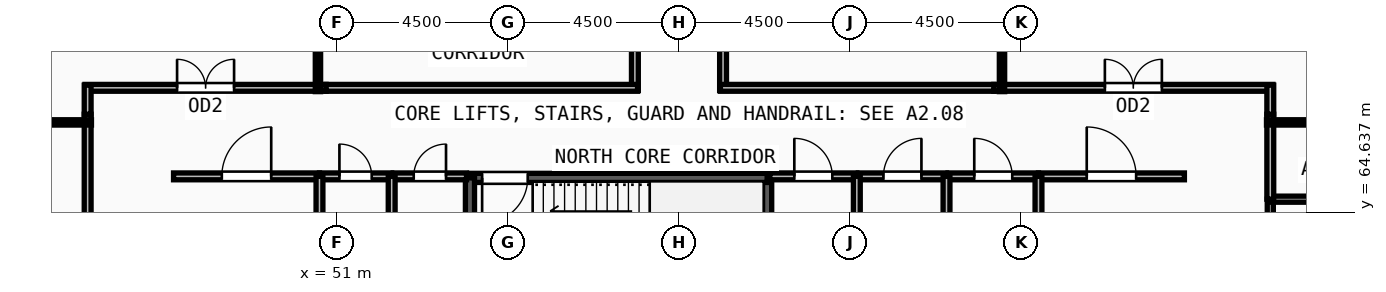
"""IFC4 building model, lengths in metres.
Left out: names, types, materials, properties, quantities, classifications, styles, units other than length and angle.
Written with IfcOpenShell. Run it as: python <this file> out.ifc"""

import sys

from ifc_helpers import new_model, si_unit, direction, frame, frame_2d, origin, place, context, subcontext, project, spatial, rectangle, extrude, source, transform, mapped, element, fill, save


model = new_model("IFC4")
c1 = context("Model", 3, precision=1e-05, world=origin(), true_north=direction((0.0, 1.0)))
c2 = subcontext(c1, "Body", "Model", "MODEL_VIEW")
j1 = project(units=[si_unit("LENGTHUNIT", "METRE"), si_unit("PLANEANGLEUNIT", "RADIAN")], contexts=[c1])
p1 = place(None, origin())
s1 = spatial("IfcSite", under=j1, at=p1, CompositionType="ELEMENT")
p2 = place(p1, origin())
s2 = spatial("IfcBuilding", under=s1, at=p2, CompositionType="ELEMENT")
p3 = place(p2, frame((0.0, 0.0, 85.5)))
s3 = spatial("IfcBuildingStorey", under=s2, at=p3, CompositionType="ELEMENT", Elevation=85.5)
p4 = place(p3, frame((62.32, 62.1, 0.0), z_axis=(0.0, 0.0, 1.0), x_axis=(0.0, 1.0, 0.0)))
e1 = element("IfcWall", 1, at=p4, inside=s3, PredefinedType="SOLIDWALL", context=c2, shape_type="SweptSolid", body=[
    extrude(rectangle(XDim=3.44, YDim=0.24, at=frame_2d((1.72, 0.0))), origin(), (0.0, 0.0, 1.0), 3.57),
])
p5 = place(p3, frame((62.32, 65.54, 0.0), z_axis=(0.0, 0.0, 1.0), x_axis=(-1.0, 0.0, 0.0)))
e2 = element("IfcWall", 2, at=p5, inside=s3, PredefinedType="SOLIDWALL", context=c2, shape_type="SweptSolid", body=[
    extrude(rectangle(XDim=7.82, YDim=0.24, at=frame_2d((3.91, 0.0))), origin(), (0.0, 0.0, 1.0), 3.57),
])
m1 = source(origin(), c2, "Body", "SweptSolid", [
    extrude(rectangle(XDim=1.2, YDim=2.2, at=frame_2d((0.6, 1.1))), frame((0.0, 0.13, 0.0), z_axis=(0.0, -1.0, 0.0), x_axis=(1.0, 0.0, 0.0)), (0.0, 0.0, 1.0), 0.26),
])
p6 = place(p5, frame((6.3, 0.0, 0.0)))
e3 = element("IfcOpeningElement", 3, at=p6, cuts=e2, PredefinedType="OPENING", context=c2, shape_type="MappedRepresentation", body=[
    mapped(m1, transform((0.0, 0.0, 0.0), x_axis=(1.0, 0.0, 0.0), y_axis=(0.0, 1.0, 0.0), z_axis=(0.0, 0.0, 1.0), scale=1.0)),
])
p7 = place(p3, frame((54.5, 65.54, 0.0), z_axis=(0.0, 0.0, 1.0), x_axis=(0.0, -1.0, 0.0)))
e4 = element("IfcWall", 4, at=p7, inside=s3, PredefinedType="SOLIDWALL", context=c2, shape_type="SweptSolid", body=[
    extrude(rectangle(XDim=3.44, YDim=0.24, at=frame_2d((1.72, 0.0))), origin(), (0.0, 0.0, 1.0), 3.57),
])
p8 = place(p3, frame((75.56, 62.24, 0.0), z_axis=(0.0, 0.0, 1.0), x_axis=(0.0, 1.0, 0.0)))
e5 = element("IfcWall", 5, at=p8, inside=s3, PredefinedType="PARTITIONING", context=c2, shape_type="SweptSolid", body=[
    extrude(rectangle(XDim=2.74, YDim=0.16, at=frame_2d((1.37, 0.0))), origin(), (0.0, 0.0, 1.0), 3.57),
])
m2 = source(origin(), c2, "Body", "SweptSolid", [
    extrude(rectangle(XDim=1.05, YDim=2.15, at=frame_2d((0.525, 1.075))), frame((0.0, 0.09, 0.0), z_axis=(0.0, -1.0, 0.0), x_axis=(1.0, 0.0, 0.0)), (0.0, 0.0, 1.0), 0.18),
])
p9 = place(p8, frame((0.845, 0.0, 0.0)))
e6 = element("IfcOpeningElement", 6, at=p9, cuts=e5, PredefinedType="OPENING", context=c2, shape_type="MappedRepresentation", body=[
    mapped(m2, transform((0.0, 0.0, 0.0), x_axis=(1.0, 0.0, 0.0), y_axis=(0.0, 1.0, 0.0), z_axis=(0.0, 0.0, 1.0), scale=1.0)),
])
p10 = place(p3, frame((50.54, 65.58, 0.0), z_axis=(0.0, 0.0, 1.0), x_axis=(1.0, 0.0, 0.0)))
e7 = element("IfcWall", 7, at=p10, inside=s3, PredefinedType="PARTITIONING", context=c2, shape_type="SweptSolid", body=[
    extrude(rectangle(XDim=1.9, YDim=0.18, at=frame_2d((0.95, 0.0))), origin(), (0.0, 0.0, 1.0), 3.57),
])
m3 = source(origin(), c2, "Body", "SweptSolid", [
    extrude(rectangle(XDim=0.85, YDim=2.1, at=frame_2d((0.425, 1.05))), frame((0.0, 0.1, 0.0), z_axis=(0.0, -1.0, 0.0), x_axis=(1.0, 0.0, 0.0)), (0.0, 0.0, 1.0), 0.2),
])
p11 = place(p10, frame((0.525, 0.0, 0.0)))
e8 = element("IfcOpeningElement", 8, at=p11, cuts=e7, PredefinedType="OPENING", context=c2, shape_type="MappedRepresentation", body=[
    mapped(m3, transform((0.0, 0.0, 0.0), x_axis=(1.0, 0.0, 0.0), y_axis=(0.0, 1.0, 0.0), z_axis=(0.0, 0.0, 1.0), scale=1.0)),
])
p12 = place(p3, frame((52.48, 65.58, 0.0), z_axis=(0.0, 0.0, 1.0), x_axis=(1.0, 0.0, 0.0)))
e9 = element("IfcWall", 9, at=p12, inside=s3, PredefinedType="PARTITIONING", context=c2, shape_type="SweptSolid", body=[
    extrude(rectangle(XDim=1.93, YDim=0.18, at=frame_2d((0.965, 0.0))), origin(), (0.0, 0.0, 1.0), 3.57),
])
p13 = place(p12, frame((0.54, 0.0, 0.0)))
e10 = element("IfcOpeningElement", 10, at=p13, cuts=e9, PredefinedType="OPENING", context=c2, shape_type="MappedRepresentation", body=[
    mapped(m3, transform((0.0, 0.0, 0.0), x_axis=(1.0, 0.0, 0.0), y_axis=(0.0, 1.0, 0.0), z_axis=(0.0, 0.0, 1.0), scale=1.0)),
])
p14 = place(p3, frame((62.39, 65.58, 0.0), z_axis=(0.0, 0.0, 1.0), x_axis=(1.0, 0.0, 0.0)))
e11 = element("IfcWall", 11, at=p14, inside=s3, PredefinedType="PARTITIONING", context=c2, shape_type="SweptSolid", body=[
    extrude(rectangle(XDim=2.29, YDim=0.18, at=frame_2d((1.145, 0.0))), origin(), (0.0, 0.0, 1.0), 3.57),
])
m4 = source(origin(), c2, "Body", "SweptSolid", [
    extrude(rectangle(XDim=1.0, YDim=2.2, at=frame_2d((0.5, 1.1))), frame((0.0, 0.1, 0.0), z_axis=(0.0, -1.0, 0.0), x_axis=(1.0, 0.0, 0.0)), (0.0, 0.0, 1.0), 0.2),
])
p15 = place(p14, frame((0.645, 0.0, 0.0)))
e12 = element("IfcOpeningElement", 12, at=p15, cuts=e11, PredefinedType="OPENING", context=c2, shape_type="MappedRepresentation", body=[
    mapped(m4, transform((0.0, 0.0, 0.0), x_axis=(1.0, 0.0, 0.0), y_axis=(0.0, 1.0, 0.0), z_axis=(0.0, 0.0, 1.0), scale=1.0)),
])
p16 = place(p3, frame((64.72, 65.58, 0.0), z_axis=(0.0, 0.0, 1.0), x_axis=(1.0, 0.0, 0.0)))
e13 = element("IfcWall", 13, at=p16, inside=s3, PredefinedType="PARTITIONING", context=c2, shape_type="SweptSolid", body=[
    extrude(rectangle(XDim=2.32, YDim=0.18, at=frame_2d((1.16, 0.0))), origin(), (0.0, 0.0, 1.0), 3.57),
])
p17 = place(p16, frame((0.66, 0.0, 0.0)))
e14 = element("IfcOpeningElement", 14, at=p17, cuts=e13, PredefinedType="OPENING", context=c2, shape_type="MappedRepresentation", body=[
    mapped(m4, transform((0.0, 0.0, 0.0), x_axis=(1.0, 0.0, 0.0), y_axis=(0.0, 1.0, 0.0), z_axis=(0.0, 0.0, 1.0), scale=1.0)),
])
p18 = place(p3, frame((67.08, 65.58, 0.0), z_axis=(0.0, 0.0, 1.0), x_axis=(1.0, 0.0, 0.0)))
e15 = element("IfcWall", 15, at=p18, inside=s3, PredefinedType="PARTITIONING", context=c2, shape_type="SweptSolid", body=[
    extrude(rectangle(XDim=2.38, YDim=0.18, at=frame_2d((1.19, 0.0))), origin(), (0.0, 0.0, 1.0), 3.57),
])
p19 = place(p18, frame((0.69, 0.0, 0.0)))
e16 = element("IfcOpeningElement", 16, at=p19, cuts=e15, PredefinedType="OPENING", context=c2, shape_type="MappedRepresentation", body=[
    mapped(m4, transform((0.0, 0.0, 0.0), x_axis=(1.0, 0.0, 0.0), y_axis=(0.0, 1.0, 0.0), z_axis=(0.0, 0.0, 1.0), scale=1.0)),
])
p20 = place(p3, frame((46.7, 65.58, 0.0), z_axis=(0.0, 0.0, 1.0), x_axis=(1.0, 0.0, 0.0)))
e17 = element("IfcWall", 17, at=p20, inside=s3, PredefinedType="PARTITIONING", context=c2, shape_type="SweptSolid", body=[
    extrude(rectangle(XDim=3.84, YDim=0.18, at=frame_2d((1.92, 0.0))), origin(), (0.0, 0.0, 1.0), 3.57),
])
m5 = source(origin(), c2, "Body", "SweptSolid", [
    extrude(rectangle(XDim=1.3, YDim=2.2, at=frame_2d((0.65, 1.1))), frame((0.0, 0.1, 0.0), z_axis=(0.0, -1.0, 0.0), x_axis=(1.0, 0.0, 0.0)), (0.0, 0.0, 1.0), 0.2),
])
p21 = place(p20, frame((1.27, 0.0, 0.0)))
e18 = element("IfcOpeningElement", 18, at=p21, cuts=e17, PredefinedType="OPENING", context=c2, shape_type="MappedRepresentation", body=[
    mapped(m5, transform((0.0, 0.0, 0.0), x_axis=(1.0, 0.0, 0.0), y_axis=(0.0, 1.0, 0.0), z_axis=(0.0, 0.0, 1.0), scale=1.0)),
])
p22 = place(p3, frame((69.46, 65.58, 0.0), z_axis=(0.0, 0.0, 1.0), x_axis=(1.0, 0.0, 0.0)))
e19 = element("IfcWall", 19, at=p22, inside=s3, PredefinedType="PARTITIONING", context=c2, shape_type="SweptSolid", body=[
    extrude(rectangle(XDim=3.84, YDim=0.18, at=frame_2d((1.92, 0.0))), origin(), (0.0, 0.0, 1.0), 3.57),
])
p23 = place(p22, frame((1.27, 0.0, 0.0)))
e20 = element("IfcOpeningElement", 20, at=p23, cuts=e19, PredefinedType="OPENING", context=c2, shape_type="MappedRepresentation", body=[
    mapped(m5, transform((0.0, 0.0, 0.0), x_axis=(1.0, 0.0, 0.0), y_axis=(0.0, 1.0, 0.0), z_axis=(0.0, 0.0, 1.0), scale=1.0)),
])
p24 = place(p3, frame((68.285, 67.91, 0.0), z_axis=(0.0, 0.0, 1.0), x_axis=(1.0, 0.0, 0.0)))
e21 = element("IfcWall", 21, at=p24, inside=s3, PredefinedType="PARTITIONING", context=c2, shape_type="SweptSolid", body=[
    extrude(rectangle(XDim=7.345, YDim=0.18, at=frame_2d((3.672, 0.0))), origin(), (0.0, 0.0, 1.0), 3.57),
])
m6 = source(origin(), c2, "Body", "SweptSolid", [
    extrude(rectangle(XDim=1.5, YDim=2.2, at=frame_2d((0.75, 1.1))), frame((0.0, 0.1, 0.0), z_axis=(0.0, -1.0, 0.0), x_axis=(1.0, 0.0, 0.0)), (0.0, 0.0, 1.0), 0.2),
])
p25 = place(p24, frame((2.922, 0.0, 0.0)))
e22 = element("IfcOpeningElement", 22, at=p25, cuts=e21, PredefinedType="OPENING", context=c2, shape_type="MappedRepresentation", body=[
    mapped(m6, transform((0.0, 0.0, 0.0), x_axis=(1.0, 0.0, 0.0), y_axis=(0.0, 1.0, 0.0), z_axis=(0.0, 0.0, 1.0), scale=1.0)),
])
p26 = place(p3, frame((61.16, 81.479, 0.0), z_axis=(0.0, 0.0, 1.0), x_axis=(0.0, -1.0, 0.0)))
e23 = element("IfcWall", 23, at=p26, inside=s3, PredefinedType="PARTITIONING", context=c2, shape_type="SweptSolid", body=[
    extrude(rectangle(XDim=13.639, YDim=0.18, at=frame_2d((6.819, 0.0))), origin(), (0.0, 0.0, 1.0), 3.57),
])
p27 = place(p26, frame((6.319, 0.0, 0.0)))
e24 = element("IfcOpeningElement", 24, at=p27, cuts=e23, PredefinedType="OPENING", context=c2, shape_type="MappedRepresentation", body=[
    mapped(m4, transform((0.0, 0.0, 0.0), x_axis=(1.0, 0.0, 0.0), y_axis=(0.0, 1.0, 0.0), z_axis=(0.0, 0.0, 1.0), scale=1.0)),
])
p28 = place(p3, frame((58.84, 67.84, 0.0), z_axis=(0.0, 0.0, 1.0), x_axis=(0.0, 1.0, 0.0)))
e25 = element("IfcWall", 25, at=p28, inside=s3, PredefinedType="PARTITIONING", context=c2, shape_type="SweptSolid", body=[
    extrude(rectangle(XDim=13.771, YDim=0.18, at=frame_2d((6.885, 0.0))), origin(), (0.0, 0.0, 1.0), 3.57),
])
p29 = place(p28, frame((6.386, 0.0, 0.0)))
e26 = element("IfcOpeningElement", 26, at=p29, cuts=e25, PredefinedType="OPENING", context=c2, shape_type="MappedRepresentation", body=[
    mapped(m4, transform((0.0, 0.0, 0.0), x_axis=(1.0, 0.0, 0.0), y_axis=(0.0, 1.0, 0.0), z_axis=(0.0, 0.0, 1.0), scale=1.0)),
])
p30 = place(p3, frame((44.37, 67.91, 0.0), z_axis=(0.0, 0.0, 1.0), x_axis=(1.0, 0.0, 0.0)))
e27 = element("IfcWall", 27, at=p30, inside=s3, PredefinedType="PARTITIONING", context=c2, shape_type="SweptSolid", body=[
    extrude(rectangle(XDim=6.345, YDim=0.18, at=frame_2d((3.172, 0.0))), origin(), (0.0, 0.0, 1.0), 3.57),
])
p31 = place(p30, frame((2.423, 0.0, 0.0)))
e28 = element("IfcOpeningElement", 28, at=p31, cuts=e27, PredefinedType="OPENING", context=c2, shape_type="MappedRepresentation", body=[
    mapped(m6, transform((0.0, 0.0, 0.0), x_axis=(1.0, 0.0, 0.0), y_axis=(0.0, 1.0, 0.0), z_axis=(0.0, 0.0, 1.0), scale=1.0)),
])
p32 = place(p3, frame((44.44, 60.285, 0.0), z_axis=(0.0, 0.0, 1.0), x_axis=(0.0, 1.0, 0.0)))
e29 = element("IfcWall", 29, at=p32, inside=s3, PredefinedType="PARTITIONING", context=c2, shape_type="SweptSolid", body=[
    extrude(rectangle(XDim=6.93, YDim=0.18, at=frame_2d((3.465, 0.0))), origin(), (0.0, 0.0, 1.0), 3.57),
])
p33 = place(p32, frame((2.715, 0.0, 0.0)))
e30 = element("IfcOpeningElement", 30, at=p33, cuts=e29, PredefinedType="OPENING", context=c2, shape_type="MappedRepresentation", body=[
    mapped(m6, transform((0.0, 0.0, 0.0), x_axis=(1.0, 0.0, 0.0), y_axis=(0.0, 1.0, 0.0), z_axis=(0.0, 0.0, 1.0), scale=1.0)),
])
p34 = place(p3, frame((75.56, 64.98, 0.0), z_axis=(0.0, 0.0, 1.0), x_axis=(1.0, 0.0, 0.0)))
e31 = element("IfcWall", 31, at=p34, inside=s3, PredefinedType="PARTITIONING", context=c2, shape_type="SweptSolid", body=[
    extrude(rectangle(XDim=4.46, YDim=0.16, at=frame_2d((2.23, 0.0))), origin(), (0.0, 0.0, 1.0), 3.57),
])
for number, where, z_axis, x_axis in (
    (32, (50.54, 61.95, 0.0), (0.0, 0.0, 1.0), (0.0, 1.0, 0.0)),
    (33, (52.44, 61.95, 0.0), (0.0, 0.0, 1.0), (0.0, 1.0, 0.0)),
    (34, (64.68, 61.95, 0.0), (0.0, 0.0, 1.0), (0.0, 1.0, 0.0)),
    (35, (67.04, 61.95, 0.0), (0.0, 0.0, 1.0), (0.0, 1.0, 0.0)),
    (36, (69.46, 61.95, 0.0), (0.0, 0.0, 1.0), (0.0, 1.0, 0.0)),
):
    element("IfcWall", number, at=place(p3, frame(where, z_axis=z_axis, x_axis=x_axis)), inside=s3, PredefinedType="PARTITIONING", context=c2, shape_type="SweptSolid", body=[
        extrude(rectangle(XDim=3.63, YDim=0.18, at=frame_2d((1.815, 0.0))), origin(), (0.0, 0.0, 1.0), 3.57),
    ])
p35 = place(p3, frame((75.56, 67.215, 0.0), z_axis=(0.0, 0.0, 1.0), x_axis=(0.0, -1.0, 0.0)))
e37 = element("IfcWall", 37, at=p35, inside=s3, PredefinedType="PARTITIONING", context=c2, shape_type="SweptSolid", body=[
    extrude(rectangle(XDim=2.235, YDim=0.18, at=frame_2d((1.118, 0.0))), origin(), (0.0, 0.0, 1.0), 3.57),
])
p36 = place(p3, frame((75.56, 67.98, 0.0), z_axis=(0.0, 0.0, 1.0), x_axis=(0.0, -1.0, 0.0)))
e38 = element("IfcWall", 38, at=p36, inside=s3, PredefinedType="PARTITIONING", context=c2, shape_type="SweptSolid", body=[
    extrude(rectangle(XDim=0.765, YDim=0.18, at=frame_2d((0.382, 0.0))), origin(), (0.0, 0.0, 1.0), 3.57),
])
p37 = place(p3, frame((61.09, 67.91, 0.0), z_axis=(0.0, 0.0, 1.0), x_axis=(1.0, 0.0, 0.0)))
e39 = element("IfcWall", 39, at=p37, inside=s3, PredefinedType="PARTITIONING", context=c2, shape_type="SweptSolid", body=[
    extrude(rectangle(XDim=7.195, YDim=0.18, at=frame_2d((3.597, 0.0))), origin(), (0.0, 0.0, 1.0), 3.57),
])
p38 = place(p3, frame((50.715, 67.91, 0.0), z_axis=(0.0, 0.0, 1.0), x_axis=(1.0, 0.0, 0.0)))
e40 = element("IfcWall", 40, at=p38, inside=s3, PredefinedType="PARTITIONING", context=c2, shape_type="SweptSolid", body=[
    extrude(rectangle(XDim=8.195, YDim=0.18, at=frame_2d((4.097, 0.0))), origin(), (0.0, 0.0, 1.0), 3.57),
])
p39 = place(p3, frame((44.44, 67.215, 0.0), z_axis=(0.0, 0.0, 1.0), x_axis=(0.0, 1.0, 0.0)))
e41 = element("IfcWall", 41, at=p39, inside=s3, PredefinedType="PARTITIONING", context=c2, shape_type="SweptSolid", body=[
    extrude(rectangle(XDim=0.765, YDim=0.18, at=frame_2d((0.382, 0.0))), origin(), (0.0, 0.0, 1.0), 3.57),
])
p40 = place(p3, frame((44.54, 67.0, 0.0), z_axis=(0.0, 0.0, 1.0), x_axis=(-1.0, 0.0, 0.0)))
e42 = element("IfcWall", 42, at=p40, inside=s3, PredefinedType="PARTITIONING", context=c2, shape_type="SweptSolid", body=[
    extrude(rectangle(XDim=21.983, YDim=0.14, at=frame_2d((10.992, 0.0))), origin(), (0.0, 0.0, 1.0), 2.655),
])
p41 = place(p3, frame((75.46, 67.0, 0.0), z_axis=(0.0, 0.0, 1.0), x_axis=(1.0, 0.0, 0.0)))
e43 = element("IfcWall", 43, at=p41, inside=s3, PredefinedType="PARTITIONING", context=c2, shape_type="SweptSolid", body=[
    extrude(rectangle(XDim=22.008, YDim=0.14, at=frame_2d((11.004, 0.0))), origin(), (0.0, 0.0, 1.0), 2.655),
])
p42 = place(p3, frame((50.5, 67.81, 0.0), z_axis=(0.0, 0.0, 1.0), x_axis=(0.0, 1.0, 0.0)))
e44 = element("IfcWall", 44, at=p42, inside=s3, PredefinedType="PARTITIONING", context=c2, shape_type="SweptSolid", body=[
    extrude(rectangle(XDim=13.537, YDim=0.14, at=frame_2d((6.769, 0.0))), origin(), (0.0, 0.0, 1.0), 3.57),
])
p43 = place(p3, frame((68.5, 67.81, 0.0), z_axis=(0.0, 0.0, 1.0), x_axis=(0.0, 1.0, 0.0)))
e45 = element("IfcWall", 45, at=p43, inside=s3, PredefinedType="PARTITIONING", context=c2, shape_type="SweptSolid", body=[
    extrude(rectangle(XDim=13.341, YDim=0.14, at=frame_2d((6.67, 0.0))), origin(), (0.0, 0.0, 1.0), 3.57),
])
m7 = source(origin(), c2, "Body", "SweptSolid", [
    extrude(rectangle(XDim=1.2, YDim=2.2, at=frame_2d((0.6, 1.1))), frame((0.0, 0.025, 0.0), z_axis=(0.0, -1.0, 0.0), x_axis=(1.0, 0.0, 0.0)), (0.0, 0.0, 1.0), 0.05),
])
p44 = place(p6, origin())
e46 = element("IfcDoor", 46, at=p44, inside=s3, OperationType="SINGLE_SWING_RIGHT", PredefinedType="DOOR", context=c2, shape_type="MappedRepresentation", body=[
    mapped(m7, transform((0.0, 0.0, 0.0), x_axis=(1.0, 0.0, 0.0), y_axis=(0.0, 1.0, 0.0), z_axis=(0.0, 0.0, 1.0), scale=1.0)),
])
fill(e3, e46)
m8 = source(origin(), c2, "Body", "SweptSolid", [
    extrude(rectangle(XDim=0.85, YDim=2.1, at=frame_2d((0.425, 1.05))), frame((0.0, 0.025, 0.0), z_axis=(0.0, -1.0, 0.0), x_axis=(1.0, 0.0, 0.0)), (0.0, 0.0, 1.0), 0.05),
])
p45 = place(p11, origin())
e47 = element("IfcDoor", 47, at=p45, inside=s3, OperationType="SINGLE_SWING_LEFT", PredefinedType="DOOR", context=c2, shape_type="MappedRepresentation", body=[
    mapped(m8, transform((0.0, 0.0, 0.0), x_axis=(1.0, 0.0, 0.0), y_axis=(0.0, 1.0, 0.0), z_axis=(0.0, 0.0, 1.0), scale=1.0)),
])
fill(e8, e47)
p46 = place(p13, origin())
e48 = element("IfcDoor", 48, at=p46, inside=s3, OperationType="SINGLE_SWING_RIGHT", PredefinedType="DOOR", context=c2, shape_type="MappedRepresentation", body=[
    mapped(m8, transform((0.0, 0.0, 0.0), x_axis=(1.0, 0.0, 0.0), y_axis=(0.0, 1.0, 0.0), z_axis=(0.0, 0.0, 1.0), scale=1.0)),
])
fill(e10, e48)
m9 = source(origin(), c2, "Body", "SweptSolid", [
    extrude(rectangle(XDim=1.0, YDim=2.2, at=frame_2d((0.5, 1.1))), frame((0.0, 0.025, 0.0), z_axis=(0.0, -1.0, 0.0), x_axis=(1.0, 0.0, 0.0)), (0.0, 0.0, 1.0), 0.05),
])
p47 = place(p15, origin())
e49 = element("IfcDoor", 49, at=p47, inside=s3, OperationType="SINGLE_SWING_LEFT", PredefinedType="DOOR", context=c2, shape_type="MappedRepresentation", body=[
    mapped(m9, transform((0.0, 0.0, 0.0), x_axis=(1.0, 0.0, 0.0), y_axis=(0.0, 1.0, 0.0), z_axis=(0.0, 0.0, 1.0), scale=1.0)),
])
fill(e12, e49)
p48 = place(p17, origin())
e50 = element("IfcDoor", 50, at=p48, inside=s3, OperationType="SINGLE_SWING_RIGHT", PredefinedType="DOOR", context=c2, shape_type="MappedRepresentation", body=[
    mapped(m9, transform((0.0, 0.0, 0.0), x_axis=(1.0, 0.0, 0.0), y_axis=(0.0, 1.0, 0.0), z_axis=(0.0, 0.0, 1.0), scale=1.0)),
])
fill(e14, e50)
p49 = place(p19, origin())
e51 = element("IfcDoor", 51, at=p49, inside=s3, OperationType="SINGLE_SWING_LEFT", PredefinedType="DOOR", context=c2, shape_type="MappedRepresentation", body=[
    mapped(m9, transform((0.0, 0.0, 0.0), x_axis=(1.0, 0.0, 0.0), y_axis=(0.0, 1.0, 0.0), z_axis=(0.0, 0.0, 1.0), scale=1.0)),
])
fill(e16, e51)
m10 = source(origin(), c2, "Body", "SweptSolid", [
    extrude(rectangle(XDim=1.3, YDim=2.2, at=frame_2d((0.65, 1.1))), frame((0.0, 0.025, 0.0), z_axis=(0.0, -1.0, 0.0), x_axis=(1.0, 0.0, 0.0)), (0.0, 0.0, 1.0), 0.05),
])
p50 = place(p21, origin())
e52 = element("IfcDoor", 52, at=p50, inside=s3, OperationType="SINGLE_SWING_RIGHT", PredefinedType="DOOR", context=c2, shape_type="MappedRepresentation", body=[
    mapped(m10, transform((0.0, 0.0, 0.0), x_axis=(1.0, 0.0, 0.0), y_axis=(0.0, 1.0, 0.0), z_axis=(0.0, 0.0, 1.0), scale=1.0)),
])
fill(e18, e52)
p51 = place(p23, origin())
e53 = element("IfcDoor", 53, at=p51, inside=s3, OperationType="SINGLE_SWING_LEFT", PredefinedType="DOOR", context=c2, shape_type="MappedRepresentation", body=[
    mapped(m10, transform((0.0, 0.0, 0.0), x_axis=(1.0, 0.0, 0.0), y_axis=(0.0, 1.0, 0.0), z_axis=(0.0, 0.0, 1.0), scale=1.0)),
])
fill(e20, e53)
m11 = source(origin(), c2, "Body", "SweptSolid", [
    extrude(rectangle(XDim=1.5, YDim=2.2, at=frame_2d((0.75, 1.1))), frame((0.0, 0.025, 0.0), z_axis=(0.0, -1.0, 0.0), x_axis=(1.0, 0.0, 0.0)), (0.0, 0.0, 1.0), 0.05),
])
p52 = place(p25, origin())
e54 = element("IfcDoor", 54, at=p52, inside=s3, OperationType="DOUBLE_DOOR_SINGLE_SWING", PredefinedType="DOOR", context=c2, shape_type="MappedRepresentation", body=[
    mapped(m11, transform((0.0, 0.0, 0.0), x_axis=(1.0, 0.0, 0.0), y_axis=(0.0, 1.0, 0.0), z_axis=(0.0, 0.0, 1.0), scale=1.0)),
])
fill(e22, e54)
p53 = place(p31, origin())
e55 = element("IfcDoor", 55, at=p53, inside=s3, OperationType="DOUBLE_DOOR_SINGLE_SWING", PredefinedType="DOOR", context=c2, shape_type="MappedRepresentation", body=[
    mapped(m11, transform((0.0, 0.0, 0.0), x_axis=(1.0, 0.0, 0.0), y_axis=(0.0, 1.0, 0.0), z_axis=(0.0, 0.0, 1.0), scale=1.0)),
])
fill(e28, e55)
save(model, sys.argv[1])
